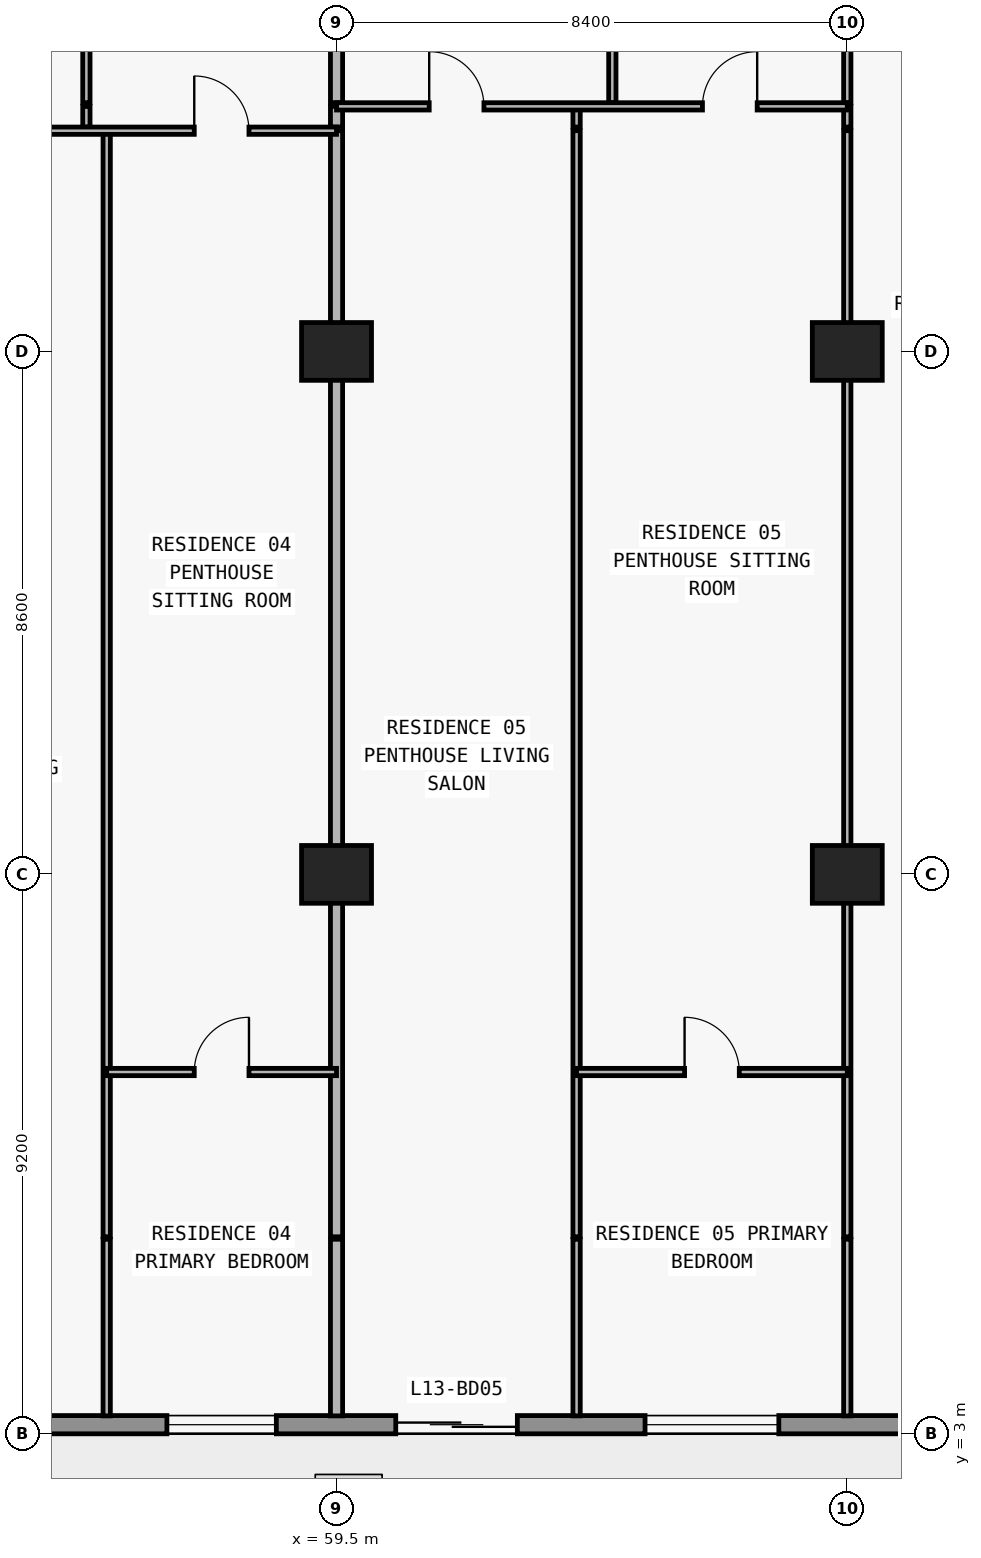
"""IFC4 building model, lengths in metres.
Left out: names, types, materials, properties, quantities, classifications, styles, units other than length and angle.
Written with IfcOpenShell. Run it as: python <this file> out.ifc"""

import sys

from ifc_helpers import new_model, si_unit, direction, frame, frame_2d, origin, origin_2d, place, context, subcontext, project, spatial, rectangle, extrude, element, fill, save


model = new_model("IFC4")
c1 = context("Model", 3, precision=1e-05, world=origin(), true_north=direction((0.0, 1.0)))
c2 = subcontext(c1, "Body", "Model", "MODEL_VIEW")
j1 = project(units=[si_unit("LENGTHUNIT", "METRE"), si_unit("PLANEANGLEUNIT", "RADIAN")], contexts=[c1])
p1 = place(None, origin())
s1 = spatial("IfcSite", under=j1, at=p1, CompositionType="ELEMENT")
p2 = place(p1, origin())
s2 = spatial("IfcBuilding", under=s1, at=p2, CompositionType="ELEMENT")
p3 = place(p2, frame((0.0, 0.0, 53.1)))
s3 = spatial("IfcBuildingStorey", under=s2, at=p3, CompositionType="ELEMENT", Elevation=53.1)
for number, where, z_axis, x_axis in (
    (1, (59.5, 12.2, 0.0), (0.0, 0.0, 1.0), (1.0, 0.0, 0.0)),
    (2, (67.9, 12.2, 0.0), (0.0, 0.0, 1.0), (1.0, 0.0, 0.0)),
    (3, (59.5, 20.8, 0.0), (0.0, 0.0, 1.0), (1.0, 0.0, 0.0)),
    (4, (67.9, 20.8, 0.0), (0.0, 0.0, 1.0), (1.0, 0.0, 0.0)),
):
    element("IfcColumn", number, at=place(p3, frame(where, z_axis=z_axis, x_axis=x_axis)), inside=s3, PredefinedType="COLUMN", context=c2, shape_type="SweptSolid", body=[
        extrude(rectangle(XDim=1.15, YDim=0.95, at=origin_2d()), origin(), (0.0, 0.0, 1.0), 3.05),
    ])
p4 = place(p3, frame((72.7, 3.15, 0.0), z_axis=(0.0, 0.0, 1.0), x_axis=(-1.0, 0.0, 0.0)))
e5 = element("IfcWall", 5, at=p4, inside=s3, PredefinedType="STANDARD", context=c2, shape_type="SweptSolid", body=[
    extrude(rectangle(XDim=67.6, YDim=0.3, at=frame_2d((33.8, 0.0))), origin(), (0.0, 0.0, 1.0), 3.05),
])
p5 = place(p4, frame((59.826, 0.0, 0.0)))
e6 = element("IfcOpeningElement", 6, at=p5, cuts=e5, PredefinedType="OPENING", context=c2, shape_type="SweptSolid", body=[
    extrude(rectangle(XDim=2.0, YDim=2.3, at=frame_2d((1.0, 1.15))), frame((0.0, 0.16, 0.0), z_axis=(0.0, -1.0, 0.0), x_axis=(1.0, 0.0, 0.0)), (0.0, 0.0, 1.0), 0.32),
])
p6 = place(p4, frame((55.526, 0.0, 0.85)))
e7 = element("IfcOpeningElement", 7, at=p6, cuts=e5, PredefinedType="OPENING", context=c2, shape_type="SweptSolid", body=[
    extrude(rectangle(XDim=2.2, YDim=1.55, at=frame_2d((1.1, 0.775))), frame((0.0, 0.16, 0.0), z_axis=(0.0, -1.0, 0.0), x_axis=(1.0, 0.0, 0.0)), (0.0, 0.0, 1.0), 0.32),
])
p7 = place(p4, frame((51.09, 0.0, 0.0)))
e8 = element("IfcOpeningElement", 8, at=p7, cuts=e5, PredefinedType="OPENING", context=c2, shape_type="SweptSolid", body=[
    extrude(rectangle(XDim=2.0, YDim=2.3, at=frame_2d((1.0, 1.15))), frame((0.0, 0.16, 0.0), z_axis=(0.0, -1.0, 0.0), x_axis=(1.0, 0.0, 0.0)), (0.0, 0.0, 1.0), 0.32),
])
p8 = place(p4, frame((46.99, 0.0, 0.85)))
e9 = element("IfcOpeningElement", 9, at=p8, cuts=e5, PredefinedType="OPENING", context=c2, shape_type="SweptSolid", body=[
    extrude(rectangle(XDim=1.8, YDim=1.55, at=frame_2d((0.9, 0.775))), frame((0.0, 0.16, 0.0), z_axis=(0.0, -1.0, 0.0), x_axis=(1.0, 0.0, 0.0)), (0.0, 0.0, 1.0), 0.32),
])
p9 = place(p4, frame((43.09, 0.0, 0.0)))
e10 = element("IfcOpeningElement", 10, at=p9, cuts=e5, PredefinedType="OPENING", context=c2, shape_type="SweptSolid", body=[
    extrude(rectangle(XDim=2.0, YDim=2.3, at=frame_2d((1.0, 1.15))), frame((0.0, 0.16, 0.0), z_axis=(0.0, -1.0, 0.0), x_axis=(1.0, 0.0, 0.0)), (0.0, 0.0, 1.0), 0.32),
])
p10 = place(p4, frame((38.41, 0.0, 0.65)))
e11 = element("IfcOpeningElement", 11, at=p10, cuts=e5, PredefinedType="OPENING", context=c2, shape_type="SweptSolid", body=[
    extrude(rectangle(XDim=2.6, YDim=1.85, at=frame_2d((1.3, 0.925))), frame((0.0, 0.16, 0.0), z_axis=(0.0, -1.0, 0.0), x_axis=(1.0, 0.0, 0.0)), (0.0, 0.0, 1.0), 0.32),
])
p11 = place(p4, frame((32.7, 0.0, 0.85)))
e12 = element("IfcOpeningElement", 12, at=p11, cuts=e5, PredefinedType="OPENING", context=c2, shape_type="SweptSolid", body=[
    extrude(rectangle(XDim=2.2, YDim=1.55, at=frame_2d((1.1, 0.775))), frame((0.0, 0.16, 0.0), z_axis=(0.0, -1.0, 0.0), x_axis=(1.0, 0.0, 0.0)), (0.0, 0.0, 1.0), 0.32),
])
p12 = place(p4, frame((24.7, 0.0, 0.85)))
e13 = element("IfcOpeningElement", 13, at=p12, cuts=e5, PredefinedType="OPENING", context=c2, shape_type="SweptSolid", body=[
    extrude(rectangle(XDim=2.2, YDim=1.55, at=frame_2d((1.1, 0.775))), frame((0.0, 0.16, 0.0), z_axis=(0.0, -1.0, 0.0), x_axis=(1.0, 0.0, 0.0)), (0.0, 0.0, 1.0), 0.32),
])
p13 = place(p4, frame((18.29, 0.0, 0.0)))
e14 = element("IfcOpeningElement", 14, at=p13, cuts=e5, PredefinedType="OPENING", context=c2, shape_type="SweptSolid", body=[
    extrude(rectangle(XDim=2.0, YDim=2.3, at=frame_2d((1.0, 1.15))), frame((0.0, 0.16, 0.0), z_axis=(0.0, -1.0, 0.0), x_axis=(1.0, 0.0, 0.0)), (0.0, 0.0, 1.0), 0.32),
])
p14 = place(p4, frame((14.19, 0.0, 0.85)))
e15 = element("IfcOpeningElement", 15, at=p14, cuts=e5, PredefinedType="OPENING", context=c2, shape_type="SweptSolid", body=[
    extrude(rectangle(XDim=1.8, YDim=1.55, at=frame_2d((0.9, 0.775))), frame((0.0, 0.16, 0.0), z_axis=(0.0, -1.0, 0.0), x_axis=(1.0, 0.0, 0.0)), (0.0, 0.0, 1.0), 0.32),
])
p15 = place(p4, frame((10.226, 0.0, 0.0)))
e16 = element("IfcOpeningElement", 16, at=p15, cuts=e5, PredefinedType="OPENING", context=c2, shape_type="SweptSolid", body=[
    extrude(rectangle(XDim=2.0, YDim=2.3, at=frame_2d((1.0, 1.15))), frame((0.0, 0.16, 0.0), z_axis=(0.0, -1.0, 0.0), x_axis=(1.0, 0.0, 0.0)), (0.0, 0.0, 1.0), 0.32),
])
p16 = place(p4, frame((5.926, 0.0, 0.85)))
e17 = element("IfcOpeningElement", 17, at=p16, cuts=e5, PredefinedType="OPENING", context=c2, shape_type="SweptSolid", body=[
    extrude(rectangle(XDim=2.2, YDim=1.55, at=frame_2d((1.1, 0.775))), frame((0.0, 0.16, 0.0), z_axis=(0.0, -1.0, 0.0), x_axis=(1.0, 0.0, 0.0)), (0.0, 0.0, 1.0), 0.32),
])
p17 = place(p3, frame((55.386, 24.49, 0.0), z_axis=(0.0, 0.0, 1.0), x_axis=(0.0, 1.0, 0.0)))
e18 = element("IfcWall", 18, at=p17, inside=s3, PredefinedType="PARTITIONING", context=c2, shape_type="SweptSolid", body=[
    extrude(rectangle(XDim=0.34, YDim=0.12, at=frame_2d((0.17, 0.0))), origin(), (0.0, 0.0, 1.0), 2.423),
])
p18 = place(p3, frame((55.386, 24.89, 0.0), z_axis=(0.0, 0.0, 1.0), x_axis=(0.0, 1.0, 0.0)))
e19 = element("IfcWall", 19, at=p18, inside=s3, PredefinedType="PARTITIONING", context=c2, shape_type="SweptSolid", body=[
    extrude(rectangle(XDim=4.69, YDim=0.12, at=frame_2d((2.345, 0.0))), origin(), (0.0, 0.0, 1.0), 2.423),
])
p19 = place(p18, frame((1.895, 0.0, 0.0)))
e20 = element("IfcOpeningElement", 20, at=p19, cuts=e19, PredefinedType="OPENING", context=c2, shape_type="SweptSolid", body=[
    extrude(rectangle(XDim=0.9, YDim=2.15, at=frame_2d((0.45, 1.075))), frame((0.0, 0.07, 0.0), z_axis=(0.0, -1.0, 0.0), x_axis=(1.0, 0.0, 0.0)), (0.0, 0.0, 1.0), 0.14),
])
p20 = place(p3, frame((55.72, 3.295, 0.0), z_axis=(0.0, 0.0, 1.0), x_axis=(0.0, 1.0, 0.0)))
e21 = element("IfcWall", 21, at=p20, inside=s3, PredefinedType="PARTITIONING", context=c2, shape_type="SweptSolid", body=[
    extrude(rectangle(XDim=2.905, YDim=0.12, at=frame_2d((1.453, 0.0))), origin(), (0.0, 0.0, 1.0), 3.05),
])
p21 = place(p3, frame((55.72, 6.24, 0.0), z_axis=(0.0, 0.0, 1.0), x_axis=(0.0, 1.0, 0.0)))
e22 = element("IfcWall", 22, at=p21, inside=s3, PredefinedType="PARTITIONING", context=c2, shape_type="SweptSolid", body=[
    extrude(rectangle(XDim=18.19, YDim=0.12, at=frame_2d((9.095, 0.0))), origin(), (0.0, 0.0, 1.0), 3.05),
])
p22 = place(p3, frame((59.5, 3.295, 0.0), z_axis=(0.0, 0.0, 1.0), x_axis=(0.0, 1.0, 0.0)))
e23 = element("IfcWall", 23, at=p22, inside=s3, PredefinedType="PARTITIONING", context=c2, shape_type="SweptSolid", body=[
    extrude(rectangle(XDim=2.905, YDim=0.2, at=frame_2d((1.453, 0.0))), origin(), (0.0, 0.0, 1.0), 3.05),
])
p23 = place(p3, frame((59.5, 6.24, 0.0), z_axis=(0.0, 0.0, 1.0), x_axis=(0.0, 1.0, 0.0)))
e24 = element("IfcWall", 24, at=p23, inside=s3, PredefinedType="PARTITIONING", context=c2, shape_type="SweptSolid", body=[
    extrude(rectangle(XDim=18.19, YDim=0.2, at=frame_2d((9.095, 0.0))), origin(), (0.0, 0.0, 1.0), 2.11),
])
p24 = place(p3, frame((59.5, 24.49, 0.0), z_axis=(0.0, 0.0, 1.0), x_axis=(0.0, 1.0, 0.0)))
e25 = element("IfcWall", 25, at=p24, inside=s3, PredefinedType="PARTITIONING", context=c2, shape_type="SweptSolid", body=[
    extrude(rectangle(XDim=0.34, YDim=0.2, at=frame_2d((0.17, 0.0))), origin(), (0.0, 0.0, 1.0), 2.11),
])
p25 = place(p3, frame((59.5, 24.89, 0.0), z_axis=(0.0, 0.0, 1.0), x_axis=(0.0, 1.0, 0.0)))
e26 = element("IfcWall", 26, at=p25, inside=s3, PredefinedType="PARTITIONING", context=c2, shape_type="SweptSolid", body=[
    extrude(rectangle(XDim=4.69, YDim=0.2, at=frame_2d((2.345, 0.0))), origin(), (0.0, 0.0, 1.0), 2.11),
])
p26 = place(p3, frame((63.448, 3.295, 0.0), z_axis=(0.0, 0.0, 1.0), x_axis=(0.0, 1.0, 0.0)))
e27 = element("IfcWall", 27, at=p26, inside=s3, PredefinedType="PARTITIONING", context=c2, shape_type="SweptSolid", body=[
    extrude(rectangle(XDim=2.905, YDim=0.12, at=frame_2d((1.453, 0.0))), origin(), (0.0, 0.0, 1.0), 3.05),
])
p27 = place(p3, frame((63.448, 6.24, 0.0), z_axis=(0.0, 0.0, 1.0), x_axis=(0.0, 1.0, 0.0)))
e28 = element("IfcWall", 28, at=p27, inside=s3, PredefinedType="PARTITIONING", context=c2, shape_type="SweptSolid", body=[
    extrude(rectangle(XDim=18.19, YDim=0.12, at=frame_2d((9.095, 0.0))), origin(), (0.0, 0.0, 1.0), 2.423),
])
p28 = place(p3, frame((63.448, 24.49, 0.0), z_axis=(0.0, 0.0, 1.0), x_axis=(0.0, 1.0, 0.0)))
e29 = element("IfcWall", 29, at=p28, inside=s3, PredefinedType="PARTITIONING", context=c2, shape_type="SweptSolid", body=[
    extrude(rectangle(XDim=0.34, YDim=0.12, at=frame_2d((0.17, 0.0))), origin(), (0.0, 0.0, 1.0), 2.423),
])
p29 = place(p3, frame((64.036, 24.89, 0.0), z_axis=(0.0, 0.0, 1.0), x_axis=(0.0, 1.0, 0.0)))
e30 = element("IfcWall", 30, at=p29, inside=s3, PredefinedType="PARTITIONING", context=c2, shape_type="SweptSolid", body=[
    extrude(rectangle(XDim=4.69, YDim=0.12, at=frame_2d((2.345, 0.0))), origin(), (0.0, 0.0, 1.0), 3.05),
])
p30 = place(p29, frame((1.895, 0.0, 0.0)))
e31 = element("IfcOpeningElement", 31, at=p30, cuts=e30, PredefinedType="OPENING", context=c2, shape_type="SweptSolid", body=[
    extrude(rectangle(XDim=0.9, YDim=2.15, at=frame_2d((0.45, 1.075))), frame((0.0, 0.07, 0.0), z_axis=(0.0, -1.0, 0.0), x_axis=(1.0, 0.0, 0.0)), (0.0, 0.0, 1.0), 0.14),
])
p31 = place(p3, frame((67.9, 3.295, 0.0), z_axis=(0.0, 0.0, 1.0), x_axis=(0.0, 1.0, 0.0)))
e32 = element("IfcWall", 32, at=p31, inside=s3, PredefinedType="PARTITIONING", context=c2, shape_type="SweptSolid", body=[
    extrude(rectangle(XDim=2.905, YDim=0.12, at=frame_2d((1.453, 0.0))), origin(), (0.0, 0.0, 1.0), 3.05),
])
p32 = place(p3, frame((67.9, 6.24, 0.0), z_axis=(0.0, 0.0, 1.0), x_axis=(0.0, 1.0, 0.0)))
e33 = element("IfcWall", 33, at=p32, inside=s3, PredefinedType="PARTITIONING", context=c2, shape_type="SweptSolid", body=[
    extrude(rectangle(XDim=18.19, YDim=0.12, at=frame_2d((9.095, 0.0))), origin(), (0.0, 0.0, 1.0), 2.11),
])
p33 = place(p3, frame((67.9, 24.49, 0.0), z_axis=(0.0, 0.0, 1.0), x_axis=(0.0, 1.0, 0.0)))
e34 = element("IfcWall", 34, at=p33, inside=s3, PredefinedType="PARTITIONING", context=c2, shape_type="SweptSolid", body=[
    extrude(rectangle(XDim=0.34, YDim=0.12, at=frame_2d((0.17, 0.0))), origin(), (0.0, 0.0, 1.0), 2.11),
])
p34 = place(p3, frame((67.9, 24.89, 0.0), z_axis=(0.0, 0.0, 1.0), x_axis=(0.0, 1.0, 0.0)))
e35 = element("IfcWall", 35, at=p34, inside=s3, PredefinedType="PARTITIONING", context=c2, shape_type="SweptSolid", body=[
    extrude(rectangle(XDim=4.69, YDim=0.12, at=frame_2d((2.345, 0.0))), origin(), (0.0, 0.0, 1.0), 2.11),
])
p35 = place(p34, frame((1.895, 0.0, 0.0)))
e36 = element("IfcOpeningElement", 36, at=p35, cuts=e35, PredefinedType="OPENING", context=c2, shape_type="SweptSolid", body=[
    extrude(rectangle(XDim=0.9, YDim=2.06, at=frame_2d((0.45, 1.03))), frame((0.0, 0.07, 0.0), z_axis=(0.0, -1.0, 0.0), x_axis=(1.0, 0.0, 0.0)), (0.0, 0.0, 1.0), 0.14),
])
p36 = place(p3, frame((55.72, 8.95, 0.0), z_axis=(0.0, 0.0, 1.0), x_axis=(1.0, 0.0, 0.0)))
e37 = element("IfcWall", 37, at=p36, inside=s3, PredefinedType="PARTITIONING", context=c2, shape_type="SweptSolid", body=[
    extrude(rectangle(XDim=3.78, YDim=0.12, at=frame_2d((1.89, 0.0))), origin(), (0.0, 0.0, 1.0), 3.05),
])
p37 = place(p36, frame((1.44, 0.0, 0.0)))
e38 = element("IfcOpeningElement", 38, at=p37, cuts=e37, PredefinedType="OPENING", context=c2, shape_type="SweptSolid", body=[
    extrude(rectangle(XDim=0.9, YDim=2.15, at=frame_2d((0.45, 1.075))), frame((0.0, 0.07, 0.0), z_axis=(0.0, -1.0, 0.0), x_axis=(1.0, 0.0, 0.0)), (0.0, 0.0, 1.0), 0.14),
])
p38 = place(p3, frame((63.448, 8.95, 0.0), z_axis=(0.0, 0.0, 1.0), x_axis=(1.0, 0.0, 0.0)))
e39 = element("IfcWall", 39, at=p38, inside=s3, PredefinedType="PARTITIONING", context=c2, shape_type="SweptSolid", body=[
    extrude(rectangle(XDim=4.452, YDim=0.12, at=frame_2d((2.226, 0.0))), origin(), (0.0, 0.0, 1.0), 3.05),
])
p39 = place(p38, frame((1.776, 0.0, 0.0)))
e40 = element("IfcOpeningElement", 40, at=p39, cuts=e39, PredefinedType="OPENING", context=c2, shape_type="SweptSolid", body=[
    extrude(rectangle(XDim=0.9, YDim=2.15, at=frame_2d((0.45, 1.075))), frame((0.0, 0.07, 0.0), z_axis=(0.0, -1.0, 0.0), x_axis=(1.0, 0.0, 0.0)), (0.0, 0.0, 1.0), 0.14),
])
p40 = place(p3, frame((51.37, 24.43, 0.0), z_axis=(0.0, 0.0, 1.0), x_axis=(1.0, 0.0, 0.0)))
e41 = element("IfcWall", 41, at=p40, inside=s3, PredefinedType="PARTITIONING", context=c2, shape_type="SweptSolid", body=[
    extrude(rectangle(XDim=8.13, YDim=0.12, at=frame_2d((4.065, 0.0))), origin(), (0.0, 0.0, 1.0), 3.05),
])
p41 = place(p40, frame((1.558, 0.0, 0.0)))
e42 = element("IfcOpeningElement", 42, at=p41, cuts=e41, PredefinedType="OPENING", context=c2, shape_type="SweptSolid", body=[
    extrude(rectangle(XDim=0.9, YDim=2.15, at=frame_2d((0.45, 1.075))), frame((0.0, 0.07, 0.0), z_axis=(0.0, -1.0, 0.0), x_axis=(1.0, 0.0, 0.0)), (0.0, 0.0, 1.0), 0.14),
])
p42 = place(p40, frame((5.79, 0.0, 0.0)))
e43 = element("IfcOpeningElement", 43, at=p42, cuts=e41, PredefinedType="OPENING", context=c2, shape_type="SweptSolid", body=[
    extrude(rectangle(XDim=0.9, YDim=2.15, at=frame_2d((0.45, 1.075))), frame((0.0, 0.07, 0.0), z_axis=(0.0, -1.0, 0.0), x_axis=(1.0, 0.0, 0.0)), (0.0, 0.0, 1.0), 0.14),
])
p43 = place(p3, frame((59.5, 24.83, 0.0), z_axis=(0.0, 0.0, 1.0), x_axis=(1.0, 0.0, 0.0)))
e44 = element("IfcWall", 44, at=p43, inside=s3, PredefinedType="PARTITIONING", context=c2, shape_type="SweptSolid", body=[
    extrude(rectangle(XDim=8.4, YDim=0.12, at=frame_2d((4.2, 0.0))), origin(), (0.0, 0.0, 1.0), 3.05),
])
p44 = place(p43, frame((1.524, 0.0, 0.0)))
e45 = element("IfcOpeningElement", 45, at=p44, cuts=e44, PredefinedType="OPENING", context=c2, shape_type="SweptSolid", body=[
    extrude(rectangle(XDim=0.9, YDim=2.15, at=frame_2d((0.45, 1.075))), frame((0.0, 0.07, 0.0), z_axis=(0.0, -1.0, 0.0), x_axis=(1.0, 0.0, 0.0)), (0.0, 0.0, 1.0), 0.14),
])
p45 = place(p43, frame((6.018, 0.0, 0.0)))
e46 = element("IfcOpeningElement", 46, at=p45, cuts=e44, PredefinedType="OPENING", context=c2, shape_type="SweptSolid", body=[
    extrude(rectangle(XDim=0.9, YDim=2.15, at=frame_2d((0.45, 1.075))), frame((0.0, 0.07, 0.0), z_axis=(0.0, -1.0, 0.0), x_axis=(1.0, 0.0, 0.0)), (0.0, 0.0, 1.0), 0.14),
])
p46 = place(p14, origin())
e47 = element("IfcWindow", 47, at=p46, inside=s3, PartitioningType="SINGLE_PANEL", PredefinedType="WINDOW", context=c2, shape_type="SweptSolid", body=[
    extrude(rectangle(XDim=1.8, YDim=1.55, at=frame_2d((0.9, 0.775))), frame((0.0, 0.03, 0.0), z_axis=(0.0, -1.0, 0.0), x_axis=(1.0, 0.0, 0.0)), (0.0, 0.0, 1.0), 0.06),
])
fill(e15, e47)
p47 = place(p15, origin())
e48 = element("IfcDoor", 48, at=p47, inside=s3, OperationType="DOUBLE_DOOR_SLIDING", PredefinedType="DOOR", context=c2, shape_type="SweptSolid", body=[
    extrude(rectangle(XDim=2.0, YDim=2.3, at=frame_2d((1.0, 1.15))), frame((0.0, 0.025, 0.0), z_axis=(0.0, -1.0, 0.0), x_axis=(1.0, 0.0, 0.0)), (0.0, 0.0, 1.0), 0.05),
])
fill(e16, e48)
p48 = place(p16, origin())
e49 = element("IfcWindow", 49, at=p48, inside=s3, PartitioningType="SINGLE_PANEL", PredefinedType="WINDOW", context=c2, shape_type="SweptSolid", body=[
    extrude(rectangle(XDim=2.2, YDim=1.55, at=frame_2d((1.1, 0.775))), frame((0.0, 0.03, 0.0), z_axis=(0.0, -1.0, 0.0), x_axis=(1.0, 0.0, 0.0)), (0.0, 0.0, 1.0), 0.06),
])
fill(e17, e49)
p49 = place(p42, origin())
e50 = element("IfcDoor", 50, at=p49, inside=s3, OperationType="SINGLE_SWING_LEFT", PredefinedType="DOOR", context=c2, shape_type="SweptSolid", body=[
    extrude(rectangle(XDim=0.9, YDim=2.15, at=frame_2d((0.45, 1.075))), frame((0.0, 0.025, 0.0), z_axis=(0.0, -1.0, 0.0), x_axis=(1.0, 0.0, 0.0)), (0.0, 0.0, 1.0), 0.05),
])
fill(e43, e50)
p50 = place(p37, origin())
e51 = element("IfcDoor", 51, at=p50, inside=s3, OperationType="SINGLE_SWING_RIGHT", PredefinedType="DOOR", context=c2, shape_type="SweptSolid", body=[
    extrude(rectangle(XDim=0.9, YDim=2.15, at=frame_2d((0.45, 1.075))), frame((0.0, 0.025, 0.0), z_axis=(0.0, -1.0, 0.0), x_axis=(1.0, 0.0, 0.0)), (0.0, 0.0, 1.0), 0.05),
])
fill(e38, e51)
p51 = place(p44, origin())
e52 = element("IfcDoor", 52, at=p51, inside=s3, OperationType="SINGLE_SWING_LEFT", PredefinedType="DOOR", context=c2, shape_type="SweptSolid", body=[
    extrude(rectangle(XDim=0.9, YDim=2.15, at=frame_2d((0.45, 1.075))), frame((0.0, 0.025, 0.0), z_axis=(0.0, -1.0, 0.0), x_axis=(1.0, 0.0, 0.0)), (0.0, 0.0, 1.0), 0.05),
])
fill(e45, e52)
p52 = place(p45, origin())
e53 = element("IfcDoor", 53, at=p52, inside=s3, OperationType="SINGLE_SWING_RIGHT", PredefinedType="DOOR", context=c2, shape_type="SweptSolid", body=[
    extrude(rectangle(XDim=0.9, YDim=2.15, at=frame_2d((0.45, 1.075))), frame((0.0, 0.025, 0.0), z_axis=(0.0, -1.0, 0.0), x_axis=(1.0, 0.0, 0.0)), (0.0, 0.0, 1.0), 0.05),
])
fill(e46, e53)
p53 = place(p39, origin())
e54 = element("IfcDoor", 54, at=p53, inside=s3, OperationType="SINGLE_SWING_LEFT", PredefinedType="DOOR", context=c2, shape_type="SweptSolid", body=[
    extrude(rectangle(XDim=0.9, YDim=2.15, at=frame_2d((0.45, 1.075))), frame((0.0, 0.025, 0.0), z_axis=(0.0, -1.0, 0.0), x_axis=(1.0, 0.0, 0.0)), (0.0, 0.0, 1.0), 0.05),
])
fill(e40, e54)
save(model, sys.argv[1])
